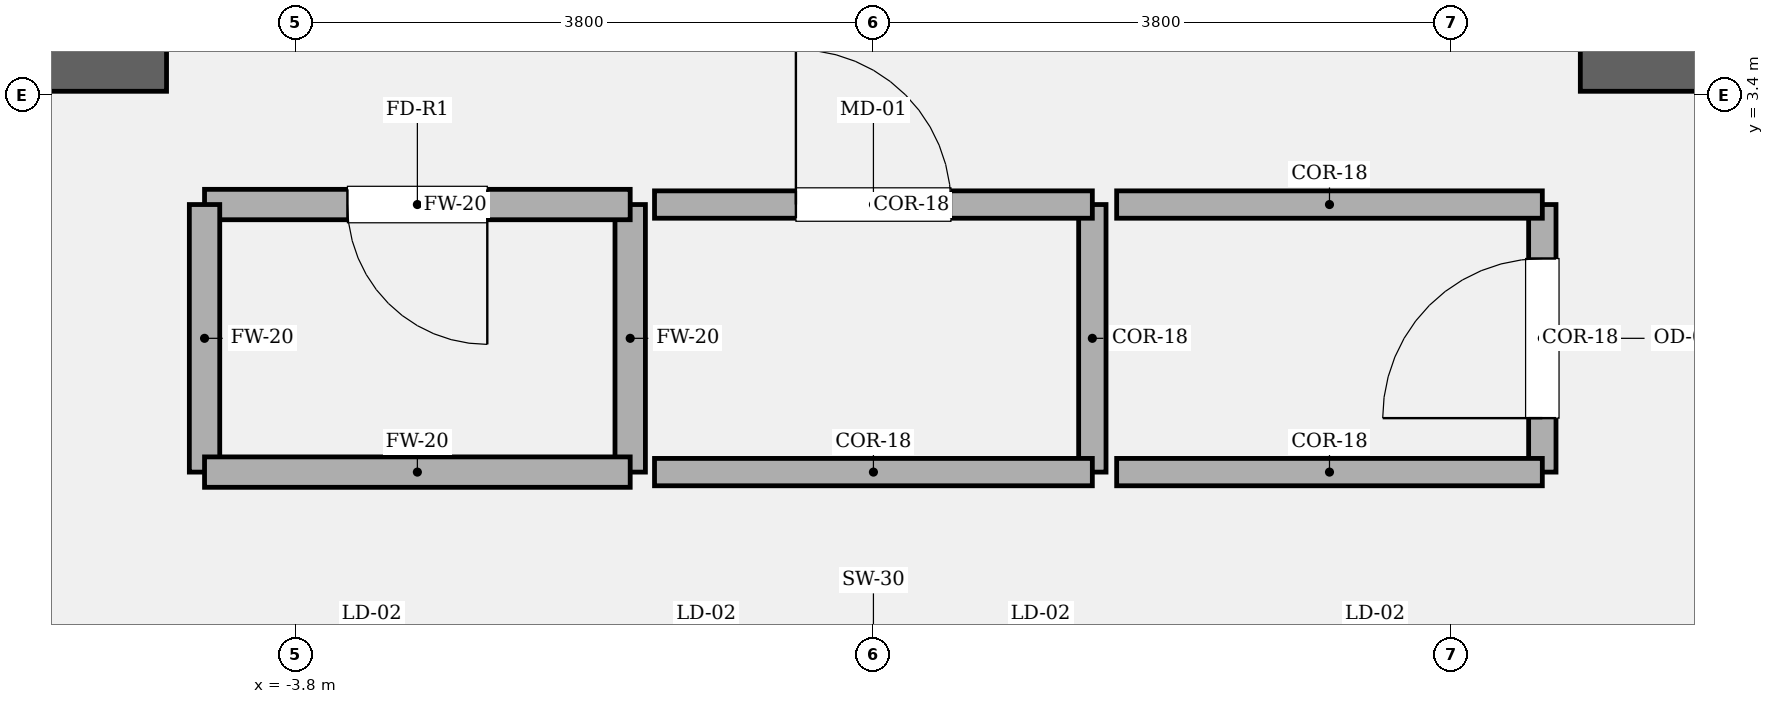
"""IFC4 building model, lengths in metres.
Left out: names, types, materials, properties, quantities, classifications, styles, units other than length and angle.
Written with IfcOpenShell. Run it as: python <this file> out.ifc"""

import sys

from ifc_helpers import new_model, si_unit, direction, frame, frame_2d, origin, place, context, subcontext, project, spatial, rectangle, extrude, element, fill, save


model = new_model("IFC4")
c1 = context("Model", 3, precision=1e-05, world=origin(), true_north=direction((0.0, 1.0)))
c2 = subcontext(c1, "Body", "Model", "MODEL_VIEW")
j1 = project(units=[si_unit("LENGTHUNIT", "METRE"), si_unit("PLANEANGLEUNIT", "RADIAN")], contexts=[c1])
p1 = place(None, origin())
s1 = spatial("IfcSite", under=j1, at=p1, CompositionType="ELEMENT")
p2 = place(p1, origin())
s2 = spatial("IfcBuilding", under=s1, at=p2, CompositionType="ELEMENT")
p3 = place(p2, frame((0.0, 0.0, 109.2)))
s3 = spatial("IfcBuildingStorey", under=s2, at=p3, CompositionType="ELEMENT", Elevation=109.2)
for number, where, z_axis, x_axis in (
    (1, (-9.825, 3.6, 0.0), (0.0, 0.0, 1.0), (1.0, 0.0, 0.0)),
    (2, (4.65, 3.6, 0.0), (0.0, 0.0, 1.0), (1.0, 0.0, 0.0)),
):
    element("IfcWall", number, at=place(p3, frame(where, z_axis=z_axis, x_axis=x_axis)), inside=s3, PredefinedType="SOLIDWALL", context=c2, shape_type="SweptSolid", body=[
        extrude(rectangle(XDim=5.175, YDim=0.35, at=frame_2d((2.587, 0.0))), origin(), (0.0, 0.0, 1.0), 4.05),
    ])
p4 = place(p3, frame((-1.6, 0.92, 0.0), z_axis=(0.0, 0.0, 1.0), x_axis=(0.0, 1.0, 0.0)))
e3 = element("IfcWall", 3, at=p4, inside=s3, PredefinedType="SOLIDWALL", context=c2, shape_type="SweptSolid", body=[
    extrude(rectangle(XDim=1.76, YDim=0.2, at=frame_2d((0.88, 0.0))), origin(), (0.0, 0.0, 1.0), 3.81),
])
p5 = place(p3, frame((-1.6, 2.68, 0.0), z_axis=(0.0, 0.0, 1.0), x_axis=(-1.0, 0.0, 0.0)))
e4 = element("IfcWall", 4, at=p5, inside=s3, PredefinedType="SOLIDWALL", context=c2, shape_type="SweptSolid", body=[
    extrude(rectangle(XDim=2.8, YDim=0.2, at=frame_2d((1.4, 0.0))), origin(), (0.0, 0.0, 1.0), 3.81),
])
p6 = place(p5, frame((0.94, 0.0, 0.0)))
e5 = element("IfcOpeningElement", 5, at=p6, cuts=e4, PredefinedType="OPENING", context=c2, shape_type="SweptSolid", body=[
    extrude(rectangle(XDim=0.92, YDim=2.1, at=frame_2d((0.46, 1.05))), frame((0.0, 0.11, 0.0), z_axis=(0.0, -1.0, 0.0), x_axis=(1.0, 0.0, 0.0)), (0.0, 0.0, 1.0), 0.22),
])
p7 = place(p3, frame((-4.4, 2.68, 0.0), z_axis=(0.0, 0.0, 1.0), x_axis=(0.0, -1.0, 0.0)))
e6 = element("IfcWall", 6, at=p7, inside=s3, PredefinedType="SOLIDWALL", context=c2, shape_type="SweptSolid", body=[
    extrude(rectangle(XDim=1.76, YDim=0.2, at=frame_2d((0.88, 0.0))), origin(), (0.0, 0.0, 1.0), 3.81),
])
p8 = place(p3, frame((-4.4, 0.92, 0.0), z_axis=(0.0, 0.0, 1.0), x_axis=(1.0, 0.0, 0.0)))
e7 = element("IfcWall", 7, at=p8, inside=s3, PredefinedType="SOLIDWALL", context=c2, shape_type="SweptSolid", body=[
    extrude(rectangle(XDim=2.8, YDim=0.2, at=frame_2d((1.4, 0.0))), origin(), (0.0, 0.0, 1.0), 3.81),
])
p9 = place(p3, frame((1.44, 0.92, 0.0), z_axis=(0.0, 0.0, 1.0), x_axis=(0.0, 1.0, 0.0)))
e8 = element("IfcWall", 8, at=p9, inside=s3, PredefinedType="PARTITIONING", context=c2, shape_type="SweptSolid", body=[
    extrude(rectangle(XDim=1.76, YDim=0.18, at=frame_2d((0.88, 0.0))), origin(), (0.0, 0.0, 1.0), 3.81),
])
p10 = place(p3, frame((1.44, 2.68, 0.0), z_axis=(0.0, 0.0, 1.0), x_axis=(-1.0, 0.0, 0.0)))
e9 = element("IfcWall", 9, at=p10, inside=s3, PredefinedType="PARTITIONING", context=c2, shape_type="SweptSolid", body=[
    extrude(rectangle(XDim=2.88, YDim=0.18, at=frame_2d((1.44, 0.0))), origin(), (0.0, 0.0, 1.0), 3.81),
])
p11 = place(p10, frame((0.93, 0.0, 0.0)))
e10 = element("IfcOpeningElement", 10, at=p11, cuts=e9, PredefinedType="OPENING", context=c2, shape_type="SweptSolid", body=[
    extrude(rectangle(XDim=1.02, YDim=2.2, at=frame_2d((0.51, 1.1))), frame((0.0, 0.1, 0.0), z_axis=(0.0, -1.0, 0.0), x_axis=(1.0, 0.0, 0.0)), (0.0, 0.0, 1.0), 0.2),
])
p12 = place(p3, frame((-1.44, 0.92, 0.0), z_axis=(0.0, 0.0, 1.0), x_axis=(1.0, 0.0, 0.0)))
e11 = element("IfcWall", 11, at=p12, inside=s3, PredefinedType="PARTITIONING", context=c2, shape_type="SweptSolid", body=[
    extrude(rectangle(XDim=2.88, YDim=0.18, at=frame_2d((1.44, 0.0))), origin(), (0.0, 0.0, 1.0), 3.81),
])
p13 = place(p3, frame((4.4, 0.92, 0.0), z_axis=(0.0, 0.0, 1.0), x_axis=(0.0, 1.0, 0.0)))
e12 = element("IfcWall", 12, at=p13, inside=s3, PredefinedType="PARTITIONING", context=c2, shape_type="SweptSolid", body=[
    extrude(rectangle(XDim=1.76, YDim=0.18, at=frame_2d((0.88, 0.0))), origin(), (0.0, 0.0, 1.0), 3.81),
])
p14 = place(p13, frame((0.355, 0.0, 0.0)))
e13 = element("IfcOpeningElement", 13, at=p14, cuts=e12, PredefinedType="OPENING", context=c2, shape_type="SweptSolid", body=[
    extrude(rectangle(XDim=1.05, YDim=2.2, at=frame_2d((0.525, 1.1))), frame((0.0, 0.1, 0.0), z_axis=(0.0, -1.0, 0.0), x_axis=(1.0, 0.0, 0.0)), (0.0, 0.0, 1.0), 0.2),
])
for number, where, z_axis, x_axis in (
    (14, (4.4, 2.68, 0.0), (0.0, 0.0, 1.0), (-1.0, 0.0, 0.0)),
    (15, (1.6, 0.92, 0.0), (0.0, 0.0, 1.0), (1.0, 0.0, 0.0)),
):
    element("IfcWall", number, at=place(p3, frame(where, z_axis=z_axis, x_axis=x_axis)), inside=s3, PredefinedType="PARTITIONING", context=c2, shape_type="SweptSolid", body=[
        extrude(rectangle(XDim=2.8, YDim=0.18, at=frame_2d((1.4, 0.0))), origin(), (0.0, 0.0, 1.0), 3.81),
    ])
p15 = place(p6, origin())
e16 = element("IfcDoor", 16, at=p15, inside=s3, OperationType="SINGLE_SWING_LEFT", PredefinedType="DOOR", context=c2, shape_type="SweptSolid", body=[
    extrude(rectangle(XDim=0.92, YDim=2.1, at=frame_2d((0.46, 1.05))), frame((0.0, 0.025, 0.0), z_axis=(0.0, -1.0, 0.0), x_axis=(1.0, 0.0, 0.0)), (0.0, 0.0, 1.0), 0.05),
])
fill(e5, e16)
p16 = place(p11, origin())
e17 = element("IfcDoor", 17, at=p16, inside=s3, OperationType="SINGLE_SWING_RIGHT", PredefinedType="DOOR", context=c2, shape_type="SweptSolid", body=[
    extrude(rectangle(XDim=1.02, YDim=2.2, at=frame_2d((0.51, 1.1))), frame((0.0, 0.025, 0.0), z_axis=(0.0, -1.0, 0.0), x_axis=(1.0, 0.0, 0.0)), (0.0, 0.0, 1.0), 0.05),
])
fill(e10, e17)
p17 = place(p14, origin())
e18 = element("IfcDoor", 18, at=p17, inside=s3, OperationType="SINGLE_SWING_LEFT", PredefinedType="DOOR", context=c2, shape_type="SweptSolid", body=[
    extrude(rectangle(XDim=1.05, YDim=2.2, at=frame_2d((0.525, 1.1))), frame((0.0, 0.025, 0.0), z_axis=(0.0, -1.0, 0.0), x_axis=(1.0, 0.0, 0.0)), (0.0, 0.0, 1.0), 0.05),
])
fill(e13, e18)
save(model, sys.argv[1])
